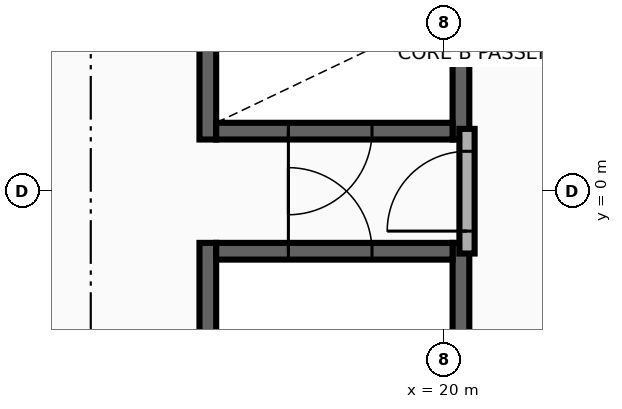
"""IFC4 building model, lengths in metres.
Left out: names, types, materials, properties, quantities, classifications, styles, units other than length and angle.
Written with IfcOpenShell. Run it as: python <this file> out.ifc"""

import sys

from ifc_helpers import new_model, si_unit, direction, frame, frame_2d, origin, place, context, subcontext, project, spatial, rectangle, extrude, element, fill, save


model = new_model("IFC4")
c1 = context("Model", 3, precision=1e-05, world=origin(), true_north=direction((0.0, 1.0)))
c2 = subcontext(c1, "Body", "Model", "MODEL_VIEW")
j1 = project(units=[si_unit("LENGTHUNIT", "METRE"), si_unit("PLANEANGLEUNIT", "RADIAN")], contexts=[c1])
p1 = place(None, origin())
s1 = spatial("IfcSite", under=j1, at=p1, CompositionType="ELEMENT")
p2 = place(p1, origin())
s2 = spatial("IfcBuilding", under=s1, at=p2, CompositionType="ELEMENT")
p3 = place(p2, frame((0.0, 0.0, 168.6)))
s3 = spatial("IfcBuildingStorey", under=s2, at=p3, CompositionType="ELEMENT", Elevation=168.6)
for number, where, z_axis, x_axis in (
    (1, (16.89, 0.68, 0.0), (0.0, 0.0, 1.0), (0.0, 1.0, 0.0)),
    (2, (20.22, 0.68, 0.0), (0.0, 0.0, 1.0), (0.0, 1.0, 0.0)),
):
    element("IfcWall", number, at=place(p3, frame(where, z_axis=z_axis, x_axis=x_axis)), inside=s3, PredefinedType="SHEAR", context=c2, shape_type="SweptSolid", body=[
        extrude(rectangle(XDim=8.595, YDim=0.22, at=frame_2d((4.297, 0.0))), origin(), (0.0, 0.0, 1.0), 3.3),
    ])
p4 = place(p3, frame((17.0, 0.79, 0.0), z_axis=(0.0, 0.0, 1.0), x_axis=(1.0, 0.0, 0.0)))
e3 = element("IfcWall", 3, at=p4, inside=s3, PredefinedType="SHEAR", context=c2, shape_type="SweptSolid", body=[
    extrude(rectangle(XDim=3.11, YDim=0.22, at=frame_2d((1.555, 0.0))), origin(), (0.0, 0.0, 1.0), 3.3),
])
p5 = place(p4, frame((0.95, 0.0, 0.0)))
e4 = element("IfcOpeningElement", 4, at=p5, cuts=e3, PredefinedType="OPENING", context=c2, shape_type="SweptSolid", body=[
    extrude(rectangle(XDim=1.1, YDim=2.15, at=frame_2d((0.55, 1.075))), frame((0.0, 0.125, 0.0), z_axis=(0.0, -1.0, 0.0), x_axis=(1.0, 0.0, 0.0)), (0.0, 0.0, 1.0), 0.25),
])
for number, where, z_axis, x_axis in (
    (5, (16.89, -9.275, 0.0), (0.0, 0.0, 1.0), (0.0, 1.0, 0.0)),
    (6, (20.22, -9.275, 0.0), (0.0, 0.0, 1.0), (0.0, 1.0, 0.0)),
):
    element("IfcWall", number, at=place(p3, frame(where, z_axis=z_axis, x_axis=x_axis)), inside=s3, PredefinedType="SHEAR", context=c2, shape_type="SweptSolid", body=[
        extrude(rectangle(XDim=8.595, YDim=0.22, at=frame_2d((4.297, 0.0))), origin(), (0.0, 0.0, 1.0), 3.3),
    ])
p6 = place(p3, frame((17.0, -0.79, 0.0), z_axis=(0.0, 0.0, 1.0), x_axis=(1.0, 0.0, 0.0)))
e7 = element("IfcWall", 7, at=p6, inside=s3, PredefinedType="SHEAR", context=c2, shape_type="SweptSolid", body=[
    extrude(rectangle(XDim=3.11, YDim=0.22, at=frame_2d((1.555, 0.0))), origin(), (0.0, 0.0, 1.0), 3.3),
])
p7 = place(p6, frame((0.95, 0.0, 0.0)))
e8 = element("IfcOpeningElement", 8, at=p7, cuts=e7, PredefinedType="OPENING", context=c2, shape_type="SweptSolid", body=[
    extrude(rectangle(XDim=1.1, YDim=2.15, at=frame_2d((0.55, 1.075))), frame((0.0, 0.125, 0.0), z_axis=(0.0, -1.0, 0.0), x_axis=(1.0, 0.0, 0.0)), (0.0, 0.0, 1.0), 0.25),
])
p8 = place(p3, frame((20.3, -0.82, 0.0), z_axis=(0.0, 0.0, 1.0), x_axis=(0.0, 1.0, 0.0)))
e9 = element("IfcWall", 9, at=p8, inside=s3, PredefinedType="PARTITIONING", context=c2, shape_type="SweptSolid", body=[
    extrude(rectangle(XDim=1.64, YDim=0.2, at=frame_2d((0.82, 0.0))), origin(), (0.0, 0.0, 1.0), 3.3),
])
p9 = place(p8, frame((0.295, 0.0, 0.0)))
e10 = element("IfcOpeningElement", 10, at=p9, cuts=e9, PredefinedType="OPENING", context=c2, shape_type="SweptSolid", body=[
    extrude(rectangle(XDim=1.05, YDim=2.15, at=frame_2d((0.525, 1.075))), frame((0.0, 0.115, 0.0), z_axis=(0.0, -1.0, 0.0), x_axis=(1.0, 0.0, 0.0)), (0.0, 0.0, 1.0), 0.23),
])
p10 = place(p9, origin())
e11 = element("IfcDoor", 11, at=p10, inside=s3, OperationType="SINGLE_SWING_RIGHT", PredefinedType="DOOR", context=c2, shape_type="SweptSolid", body=[
    extrude(rectangle(XDim=1.05, YDim=2.15, at=frame_2d((0.525, 1.075))), frame((0.0, 0.025, 0.0), z_axis=(0.0, -1.0, 0.0), x_axis=(1.0, 0.0, 0.0)), (0.0, 0.0, 1.0), 0.05),
])
fill(e10, e11)
p11 = place(p5, frame((1.1, 0.0, 0.0), z_axis=(0.0, 0.0, 1.0), x_axis=(-1.0, 0.0, 0.0)))
e12 = element("IfcDoor", 12, at=p11, inside=s3, OperationType="SINGLE_SWING_LEFT", PredefinedType="DOOR", context=c2, shape_type="SweptSolid", body=[
    extrude(rectangle(XDim=1.1, YDim=2.15, at=frame_2d((0.55, 1.075))), frame((0.0, 0.025, 0.0), z_axis=(0.0, -1.0, 0.0), x_axis=(1.0, 0.0, 0.0)), (0.0, 0.0, 1.0), 0.05),
])
fill(e4, e12)
p12 = place(p7, origin())
e13 = element("IfcDoor", 13, at=p12, inside=s3, OperationType="SINGLE_SWING_RIGHT", PredefinedType="DOOR", context=c2, shape_type="SweptSolid", body=[
    extrude(rectangle(XDim=1.1, YDim=2.15, at=frame_2d((0.55, 1.075))), frame((0.0, 0.025, 0.0), z_axis=(0.0, -1.0, 0.0), x_axis=(1.0, 0.0, 0.0)), (0.0, 0.0, 1.0), 0.05),
])
fill(e8, e13)
save(model, sys.argv[1])
